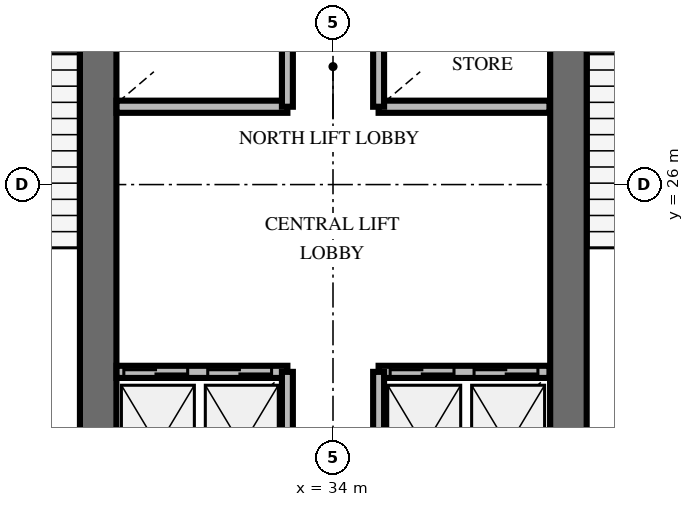
"""IFC4 building model, lengths in metres.
Left out: names, types, materials, properties, quantities, classifications, styles, units other than length and angle.
Written with IfcOpenShell. Run it as: python <this file> out.ifc"""

import sys

from ifc_helpers import new_model, si_unit, direction, frame, frame_2d, origin, place, context, subcontext, project, spatial, rectangle, extrude, element, fill, save


model = new_model("IFC4")
c1 = context("Model", 3, precision=1e-05, world=origin(), true_north=direction((0.0, 1.0)))
c2 = subcontext(c1, "Body", "Model", "MODEL_VIEW")
j1 = project(units=[si_unit("LENGTHUNIT", "METRE"), si_unit("PLANEANGLEUNIT", "RADIAN")], contexts=[c1])
p1 = place(None, origin())
s1 = spatial("IfcSite", under=j1, at=p1, CompositionType="ELEMENT")
p2 = place(p1, origin())
s2 = spatial("IfcBuilding", under=s1, at=p2, CompositionType="ELEMENT")
p3 = place(p2, frame((0.0, 0.0, 149.8)))
s3 = spatial("IfcBuildingStorey", under=s2, at=p3, CompositionType="ELEMENT", Elevation=149.8)
for number, where, z_axis, x_axis in (
    (1, (30.138, 20.187, 0.0), (0.0, 0.0, 1.0), (0.0, 1.0, 0.0)),
    (2, (37.872, 20.187, 0.0), (0.0, 0.0, 1.0), (0.0, 1.0, 0.0)),
):
    element("IfcWall", number, at=place(p3, frame(where, z_axis=z_axis, x_axis=x_axis)), inside=s3, PredefinedType="SHEAR", context=c2, shape_type="SweptSolid", body=[
        extrude(rectangle(XDim=9.826, YDim=0.6, at=frame_2d((4.913, 0.0))), origin(), (0.0, 0.0, 1.0), 4.0),
    ])
p4 = place(p3, frame((30.44, 22.92, 0.0), z_axis=(0.0, 0.0, 1.0), x_axis=(1.0, 0.0, 0.0)))
e3 = element("IfcWall", 3, at=p4, inside=s3, PredefinedType="SOLIDWALL", context=c2, shape_type="SweptSolid", body=[
    extrude(rectangle(XDim=2.81, YDim=0.2, at=frame_2d((1.405, 0.0))), origin(), (0.0, 0.0, 1.0), 2.8),
])
p5 = place(p4, frame((0.12, 0.0, 0.0)))
e4 = element("IfcOpeningElement", 4, at=p5, cuts=e3, PredefinedType="OPENING", context=c2, shape_type="SweptSolid", body=[
    extrude(rectangle(XDim=1.05, YDim=2.1, at=frame_2d((0.525, 1.05))), frame((0.0, 0.11, 0.0), z_axis=(0.0, -1.0, 0.0), x_axis=(1.0, 0.0, 0.0)), (0.0, 0.0, 1.0), 0.22),
])
p6 = place(p4, frame((1.5, 0.0, 0.0)))
e5 = element("IfcOpeningElement", 5, at=p6, cuts=e3, PredefinedType="OPENING", context=c2, shape_type="SweptSolid", body=[
    extrude(rectangle(XDim=1.05, YDim=2.1, at=frame_2d((0.525, 1.05))), frame((0.0, 0.11, 0.0), z_axis=(0.0, -1.0, 0.0), x_axis=(1.0, 0.0, 0.0)), (0.0, 0.0, 1.0), 0.22),
])
p7 = place(p3, frame((33.25, 20.5, 0.0), z_axis=(0.0, 0.0, 1.0), x_axis=(0.0, 1.0, 0.0)))
e6 = element("IfcWall", 6, at=p7, inside=s3, PredefinedType="SOLIDWALL", context=c2, shape_type="SweptSolid", body=[
    extrude(rectangle(XDim=2.42, YDim=0.18, at=frame_2d((1.21, 0.0))), origin(), (0.0, 0.0, 1.0), 2.8),
])
p8 = place(p3, frame((34.75, 22.92, 0.0), z_axis=(0.0, 0.0, 1.0), x_axis=(1.0, 0.0, 0.0)))
e7 = element("IfcWall", 7, at=p8, inside=s3, PredefinedType="SOLIDWALL", context=c2, shape_type="SweptSolid", body=[
    extrude(rectangle(XDim=2.81, YDim=0.2, at=frame_2d((1.405, 0.0))), origin(), (0.0, 0.0, 1.0), 2.8),
])
p9 = place(p8, frame((0.19, 0.0, 0.0)))
e8 = element("IfcOpeningElement", 8, at=p9, cuts=e7, PredefinedType="OPENING", context=c2, shape_type="SweptSolid", body=[
    extrude(rectangle(XDim=1.05, YDim=2.1, at=frame_2d((0.525, 1.05))), frame((0.0, 0.11, 0.0), z_axis=(0.0, -1.0, 0.0), x_axis=(1.0, 0.0, 0.0)), (0.0, 0.0, 1.0), 0.22),
])
p10 = place(p8, frame((1.57, 0.0, 0.0)))
e9 = element("IfcOpeningElement", 9, at=p10, cuts=e7, PredefinedType="OPENING", context=c2, shape_type="SweptSolid", body=[
    extrude(rectangle(XDim=1.05, YDim=2.1, at=frame_2d((0.525, 1.05))), frame((0.0, 0.11, 0.0), z_axis=(0.0, -1.0, 0.0), x_axis=(1.0, 0.0, 0.0)), (0.0, 0.0, 1.0), 0.22),
])
p11 = place(p3, frame((34.75, 20.5, 0.0), z_axis=(0.0, 0.0, 1.0), x_axis=(0.0, 1.0, 0.0)))
e10 = element("IfcWall", 10, at=p11, inside=s3, PredefinedType="SOLIDWALL", context=c2, shape_type="SweptSolid", body=[
    extrude(rectangle(XDim=2.42, YDim=0.18, at=frame_2d((1.21, 0.0))), origin(), (0.0, 0.0, 1.0), 2.8),
])
p12 = place(p3, frame((30.44, 27.28, 0.0), z_axis=(0.0, 0.0, 1.0), x_axis=(1.0, 0.0, 0.0)))
e11 = element("IfcWall", 11, at=p12, inside=s3, PredefinedType="SOLIDWALL", context=c2, shape_type="SweptSolid", body=[
    extrude(rectangle(XDim=2.81, YDim=0.2, at=frame_2d((1.405, 0.0))), origin(), (0.0, 0.0, 1.0), 2.8),
])
p13 = place(p3, frame((33.25, 27.28, 0.0), z_axis=(0.0, 0.0, 1.0), x_axis=(0.0, 1.0, 0.0)))
e12 = element("IfcWall", 12, at=p13, inside=s3, PredefinedType="SOLIDWALL", context=c2, shape_type="SweptSolid", body=[
    extrude(rectangle(XDim=2.47, YDim=0.18, at=frame_2d((1.235, 0.0))), origin(), (0.0, 0.0, 1.0), 2.8),
])
p14 = place(p3, frame((34.75, 27.28, 0.0), z_axis=(0.0, 0.0, 1.0), x_axis=(1.0, 0.0, 0.0)))
e13 = element("IfcWall", 13, at=p14, inside=s3, PredefinedType="SOLIDWALL", context=c2, shape_type="SweptSolid", body=[
    extrude(rectangle(XDim=2.81, YDim=0.2, at=frame_2d((1.405, 0.0))), origin(), (0.0, 0.0, 1.0), 2.8),
])
p15 = place(p3, frame((34.75, 27.28, 0.0), z_axis=(0.0, 0.0, 1.0), x_axis=(0.0, 1.0, 0.0)))
e14 = element("IfcWall", 14, at=p15, inside=s3, PredefinedType="SOLIDWALL", context=c2, shape_type="SweptSolid", body=[
    extrude(rectangle(XDim=2.47, YDim=0.18, at=frame_2d((1.235, 0.0))), origin(), (0.0, 0.0, 1.0), 2.8),
])
p16 = place(p5, origin())
e15 = element("IfcDoor", 15, at=p16, inside=s3, OperationType="DOUBLE_DOOR_SLIDING", PredefinedType="USERDEFINED", context=c2, shape_type="SweptSolid", body=[
    extrude(rectangle(XDim=1.05, YDim=2.1, at=frame_2d((0.525, 1.05))), frame((0.0, 0.025, 0.0), z_axis=(0.0, -1.0, 0.0), x_axis=(1.0, 0.0, 0.0)), (0.0, 0.0, 1.0), 0.05),
])
fill(e4, e15)
p17 = place(p6, origin())
e16 = element("IfcDoor", 16, at=p17, inside=s3, OperationType="DOUBLE_DOOR_SLIDING", PredefinedType="USERDEFINED", context=c2, shape_type="SweptSolid", body=[
    extrude(rectangle(XDim=1.05, YDim=2.1, at=frame_2d((0.525, 1.05))), frame((0.0, 0.025, 0.0), z_axis=(0.0, -1.0, 0.0), x_axis=(1.0, 0.0, 0.0)), (0.0, 0.0, 1.0), 0.05),
])
fill(e5, e16)
p18 = place(p9, origin())
e17 = element("IfcDoor", 17, at=p18, inside=s3, OperationType="DOUBLE_DOOR_SLIDING", PredefinedType="USERDEFINED", context=c2, shape_type="SweptSolid", body=[
    extrude(rectangle(XDim=1.05, YDim=2.1, at=frame_2d((0.525, 1.05))), frame((0.0, 0.025, 0.0), z_axis=(0.0, -1.0, 0.0), x_axis=(1.0, 0.0, 0.0)), (0.0, 0.0, 1.0), 0.05),
])
fill(e8, e17)
p19 = place(p10, origin())
e18 = element("IfcDoor", 18, at=p19, inside=s3, OperationType="DOUBLE_DOOR_SLIDING", PredefinedType="USERDEFINED", context=c2, shape_type="SweptSolid", body=[
    extrude(rectangle(XDim=1.05, YDim=2.1, at=frame_2d((0.525, 1.05))), frame((0.0, 0.025, 0.0), z_axis=(0.0, -1.0, 0.0), x_axis=(1.0, 0.0, 0.0)), (0.0, 0.0, 1.0), 0.05),
])
fill(e9, e18)
save(model, sys.argv[1])
